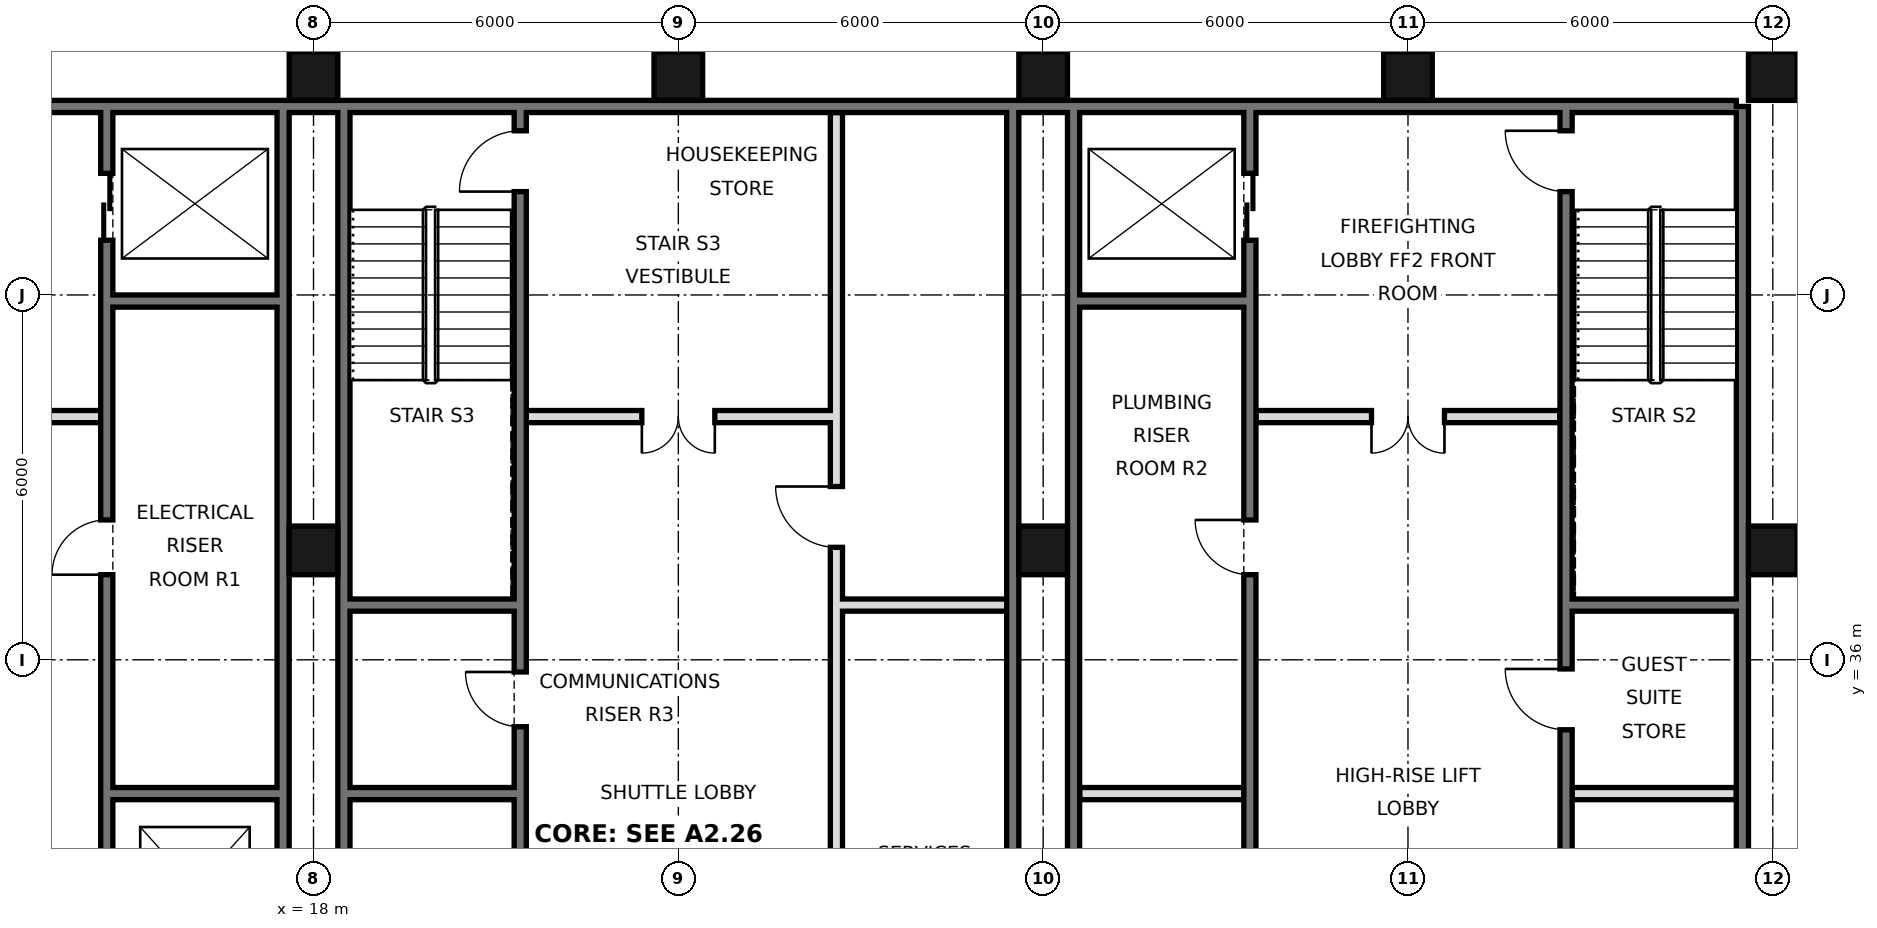
"""IFC4 building model, lengths in metres.
Left out: names, types, materials, properties, quantities, classifications, styles, units other than length and angle.
Written with IfcOpenShell. Run it as: python <this file> out.ifc"""

import sys

from ifc_helpers import new_model, si_unit, direction, frame, frame_2d, origin, origin_2d, place, context, subcontext, project, spatial, rectangle, hollow_rectangle, extrude, element, fill, save


model = new_model("IFC4")
c1 = context("Model", 3, precision=1e-05, world=origin(), true_north=direction((0.0, 1.0)))
c2 = subcontext(c1, "Body", "Model", "MODEL_VIEW")
j1 = project(units=[si_unit("LENGTHUNIT", "METRE"), si_unit("PLANEANGLEUNIT", "RADIAN")], contexts=[c1])
p1 = place(None, origin())
s1 = spatial("IfcSite", under=j1, at=p1, CompositionType="ELEMENT")
p2 = place(p1, origin())
s2 = spatial("IfcBuilding", under=s1, at=p2, CompositionType="ELEMENT")
p3 = place(p2, frame((0.0, 0.0, 103.4)))
s3 = spatial("IfcBuildingStorey", under=s2, at=p3, CompositionType="ELEMENT", Elevation=103.4)
for number, where, z_axis, x_axis in (
    (1, (18.0, 37.8, 0.0), (0.0, 0.0, 1.0), (1.0, 0.0, 0.0)),
    (2, (18.0, 45.6, 0.0), (0.0, 0.0, 1.0), (1.0, 0.0, 0.0)),
    (3, (24.0, 45.6, 0.0), (0.0, 0.0, 1.0), (1.0, 0.0, 0.0)),
    (4, (30.0, 37.8, 0.0), (0.0, 0.0, 1.0), (1.0, 0.0, 0.0)),
    (5, (30.0, 45.6, 0.0), (0.0, 0.0, 1.0), (1.0, 0.0, 0.0)),
    (6, (36.0, 45.6, 0.0), (0.0, 0.0, 1.0), (1.0, 0.0, 0.0)),
    (7, (42.0, 37.8, 0.0), (0.0, 0.0, 1.0), (1.0, 0.0, 0.0)),
    (8, (42.0, 45.6, 0.0), (0.0, 0.0, 1.0), (1.0, 0.0, 0.0)),
):
    element("IfcColumn", number, at=place(p3, frame(where, z_axis=z_axis, x_axis=x_axis)), inside=s3, PredefinedType="COLUMN", context=c2, shape_type="SweptSolid", body=[
        extrude(hollow_rectangle(XDim=0.8, YDim=0.8, WallThickness=0.05, at=origin_2d()), origin(), (0.0, 0.0, 1.0), 3.6),
    ])
p4 = place(p3, frame((41.5, 21.6, 0.0), z_axis=(0.0, 0.0, 1.0), x_axis=(0.0, 1.0, 0.0)))
e9 = element("IfcWall", 9, at=p4, inside=s3, PredefinedType="SOLIDWALL", context=c2, shape_type="SweptSolid", body=[
    extrude(rectangle(XDim=23.5, YDim=0.2, at=frame_2d((11.75, 0.0))), origin(), (0.0, 0.0, 1.0), 3.42),
])
p5 = place(p3, frame((6.6, 45.1, 0.0), z_axis=(0.0, 0.0, 1.0), x_axis=(1.0, 0.0, 0.0)))
e10 = element("IfcWall", 10, at=p5, inside=s3, PredefinedType="SOLIDWALL", context=c2, shape_type="SweptSolid", body=[
    extrude(rectangle(XDim=34.8, YDim=0.2, at=frame_2d((17.4, 0.0))), origin(), (0.0, 0.0, 1.0), 3.42),
])
for number, where, z_axis, x_axis in (
    (11, (17.5, 27.6, 0.0), (0.0, 0.0, 1.0), (0.0, 1.0, 0.0)),
    (12, (18.5, 27.6, 0.0), (0.0, 0.0, 1.0), (0.0, 1.0, 0.0)),
    (13, (29.5, 27.6, 0.0), (0.0, 0.0, 1.0), (0.0, 1.0, 0.0)),
    (14, (30.5, 27.6, 0.0), (0.0, 0.0, 1.0), (0.0, 1.0, 0.0)),
):
    element("IfcWall", number, at=place(p3, frame(where, z_axis=z_axis, x_axis=x_axis)), inside=s3, PredefinedType="SOLIDWALL", context=c2, shape_type="SweptSolid", body=[
        extrude(rectangle(XDim=17.5, YDim=0.2, at=frame_2d((8.75, 0.0))), origin(), (0.0, 0.0, 1.0), 3.42),
    ])
p6 = place(p3, frame((14.6, 27.5, 0.0), z_axis=(0.0, 0.0, 1.0), x_axis=(0.0, 1.0, 0.0)))
e15 = element("IfcWall", 15, at=p6, inside=s3, PredefinedType="SOLIDWALL", context=c2, shape_type="SweptSolid", body=[
    extrude(rectangle(XDim=17.5, YDim=0.2, at=frame_2d((8.75, 0.0))), origin(), (0.0, 0.0, 1.0), 3.42),
])
p7 = place(p6, frame((1.1, 0.0, 0.0)))
e16 = element("IfcOpeningElement", 16, at=p7, cuts=e15, PredefinedType="OPENING", context=c2, shape_type="SweptSolid", body=[
    extrude(rectangle(XDim=1.1, YDim=2.1, at=frame_2d((0.55, 1.05))), frame((0.0, 0.11, 0.0), z_axis=(0.0, -1.0, 0.0), x_axis=(1.0, 0.0, 0.0)), (0.0, 0.0, 1.0), 0.22),
])
p8 = place(p6, frame((4.2, 0.0, 0.0)))
e17 = element("IfcOpeningElement", 17, at=p8, cuts=e15, PredefinedType="OPENING", context=c2, shape_type="SweptSolid", body=[
    extrude(rectangle(XDim=1.1, YDim=2.1, at=frame_2d((0.55, 1.05))), frame((0.0, 0.11, 0.0), z_axis=(0.0, -1.0, 0.0), x_axis=(1.0, 0.0, 0.0)), (0.0, 0.0, 1.0), 0.22),
])
p9 = place(p6, frame((15.4, 0.0, 0.0)))
e18 = element("IfcOpeningElement", 18, at=p9, cuts=e15, PredefinedType="OPENING", context=c2, shape_type="SweptSolid", body=[
    extrude(rectangle(XDim=1.1, YDim=2.1, at=frame_2d((0.55, 1.05))), frame((0.0, 0.11, 0.0), z_axis=(0.0, -1.0, 0.0), x_axis=(1.0, 0.0, 0.0)), (0.0, 0.0, 1.0), 0.22),
])
p10 = place(p6, frame((9.9, 0.0, 0.0)))
e19 = element("IfcOpeningElement", 19, at=p10, cuts=e15, PredefinedType="OPENING", context=c2, shape_type="SweptSolid", body=[
    extrude(rectangle(XDim=0.9, YDim=2.1, at=frame_2d((0.45, 1.05))), frame((0.0, 0.11, 0.0), z_axis=(0.0, -1.0, 0.0), x_axis=(1.0, 0.0, 0.0)), (0.0, 0.0, 1.0), 0.22),
])
p11 = place(p3, frame((21.4, 27.5, 0.0), z_axis=(0.0, 0.0, 1.0), x_axis=(0.0, 1.0, 0.0)))
e20 = element("IfcWall", 20, at=p11, inside=s3, PredefinedType="SOLIDWALL", context=c2, shape_type="SweptSolid", body=[
    extrude(rectangle(XDim=17.5, YDim=0.2, at=frame_2d((8.75, 0.0))), origin(), (0.0, 0.0, 1.0), 3.42),
])
p12 = place(p11, frame((16.2, 0.0, 0.0)))
e21 = element("IfcOpeningElement", 21, at=p12, cuts=e20, PredefinedType="OPENING", context=c2, shape_type="SweptSolid", body=[
    extrude(rectangle(XDim=1.0, YDim=2.1, at=frame_2d((0.5, 1.05))), frame((0.0, 0.11, 0.0), z_axis=(0.0, -1.0, 0.0), x_axis=(1.0, 0.0, 0.0)), (0.0, 0.0, 1.0), 0.22),
])
p13 = place(p11, frame((7.4, 0.0, 0.0)))
e22 = element("IfcOpeningElement", 22, at=p13, cuts=e20, PredefinedType="OPENING", context=c2, shape_type="SweptSolid", body=[
    extrude(rectangle(XDim=0.9, YDim=2.1, at=frame_2d((0.45, 1.05))), frame((0.0, 0.11, 0.0), z_axis=(0.0, -1.0, 0.0), x_axis=(1.0, 0.0, 0.0)), (0.0, 0.0, 1.0), 0.22),
])
p14 = place(p3, frame((26.6, 27.5, 0.0), z_axis=(0.0, 0.0, 1.0), x_axis=(0.0, 1.0, 0.0)))
e23 = element("IfcWall", 23, at=p14, inside=s3, PredefinedType="SOLIDWALL", context=c2, shape_type="SweptSolid", body=[
    extrude(rectangle(XDim=17.5, YDim=0.2, at=frame_2d((8.75, 0.0))), origin(), (0.0, 0.0, 1.0), 3.42),
])
p15 = place(p14, frame((4.3, 0.0, 0.0)))
e24 = element("IfcOpeningElement", 24, at=p15, cuts=e23, PredefinedType="OPENING", context=c2, shape_type="SweptSolid", body=[
    extrude(rectangle(XDim=0.9, YDim=2.1, at=frame_2d((0.45, 1.05))), frame((0.0, 0.11, 0.0), z_axis=(0.0, -1.0, 0.0), x_axis=(1.0, 0.0, 0.0)), (0.0, 0.0, 1.0), 0.22),
])
p16 = place(p14, frame((10.35, 0.0, 0.0)))
e25 = element("IfcOpeningElement", 25, at=p16, cuts=e23, PredefinedType="OPENING", context=c2, shape_type="SweptSolid", body=[
    extrude(rectangle(XDim=1.0, YDim=2.1, at=frame_2d((0.5, 1.05))), frame((0.0, 0.11, 0.0), z_axis=(0.0, -1.0, 0.0), x_axis=(1.0, 0.0, 0.0)), (0.0, 0.0, 1.0), 0.22),
])
p17 = place(p3, frame((33.4, 27.5, 0.0), z_axis=(0.0, 0.0, 1.0), x_axis=(0.0, 1.0, 0.0)))
e26 = element("IfcWall", 26, at=p17, inside=s3, PredefinedType="SOLIDWALL", context=c2, shape_type="SweptSolid", body=[
    extrude(rectangle(XDim=17.5, YDim=0.2, at=frame_2d((8.75, 0.0))), origin(), (0.0, 0.0, 1.0), 3.42),
])
p18 = place(p17, frame((15.4, 0.0, 0.0)))
e27 = element("IfcOpeningElement", 27, at=p18, cuts=e26, PredefinedType="OPENING", context=c2, shape_type="SweptSolid", body=[
    extrude(rectangle(XDim=1.1, YDim=2.1, at=frame_2d((0.55, 1.05))), frame((0.0, 0.11, 0.0), z_axis=(0.0, -1.0, 0.0), x_axis=(1.0, 0.0, 0.0)), (0.0, 0.0, 1.0), 0.22),
])
p19 = place(p17, frame((2.7, 0.0, 0.0)))
e28 = element("IfcOpeningElement", 28, at=p19, cuts=e26, PredefinedType="OPENING", context=c2, shape_type="SweptSolid", body=[
    extrude(rectangle(XDim=1.0, YDim=2.1, at=frame_2d((0.5, 1.05))), frame((0.0, 0.11, 0.0), z_axis=(0.0, -1.0, 0.0), x_axis=(1.0, 0.0, 0.0)), (0.0, 0.0, 1.0), 0.22),
])
p20 = place(p17, frame((9.9, 0.0, 0.0)))
e29 = element("IfcOpeningElement", 29, at=p20, cuts=e26, PredefinedType="OPENING", context=c2, shape_type="SweptSolid", body=[
    extrude(rectangle(XDim=0.9, YDim=2.1, at=frame_2d((0.45, 1.05))), frame((0.0, 0.11, 0.0), z_axis=(0.0, -1.0, 0.0), x_axis=(1.0, 0.0, 0.0)), (0.0, 0.0, 1.0), 0.22),
])
p21 = place(p3, frame((38.6, 21.6, 0.0), z_axis=(0.0, 0.0, 1.0), x_axis=(0.0, 1.0, 0.0)))
e30 = element("IfcWall", 30, at=p21, inside=s3, PredefinedType="SOLIDWALL", context=c2, shape_type="SweptSolid", body=[
    extrude(rectangle(XDim=23.4, YDim=0.2, at=frame_2d((11.7, 0.0))), origin(), (0.0, 0.0, 1.0), 3.42),
])
p22 = place(p21, frame((8.6, 0.0, 0.0)))
e31 = element("IfcOpeningElement", 31, at=p22, cuts=e30, PredefinedType="OPENING", context=c2, shape_type="SweptSolid", body=[
    extrude(rectangle(XDim=1.0, YDim=2.1, at=frame_2d((0.5, 1.05))), frame((0.0, 0.11, 0.0), z_axis=(0.0, -1.0, 0.0), x_axis=(1.0, 0.0, 0.0)), (0.0, 0.0, 1.0), 0.22),
])
p23 = place(p21, frame((13.25, 0.0, 0.0)))
e32 = element("IfcOpeningElement", 32, at=p23, cuts=e30, PredefinedType="OPENING", context=c2, shape_type="SweptSolid", body=[
    extrude(rectangle(XDim=1.0, YDim=2.1, at=frame_2d((0.5, 1.05))), frame((0.0, 0.11, 0.0), z_axis=(0.0, -1.0, 0.0), x_axis=(1.0, 0.0, 0.0)), (0.0, 0.0, 1.0), 0.22),
])
p24 = place(p21, frame((22.1, 0.0, 0.0)))
e33 = element("IfcOpeningElement", 33, at=p24, cuts=e30, PredefinedType="OPENING", context=c2, shape_type="SweptSolid", body=[
    extrude(rectangle(XDim=1.0, YDim=2.1, at=frame_2d((0.5, 1.05))), frame((0.0, 0.11, 0.0), z_axis=(0.0, -1.0, 0.0), x_axis=(1.0, 0.0, 0.0)), (0.0, 0.0, 1.0), 0.22),
])
p25 = place(p21, frame((0.175, 0.0, 0.0)))
e34 = element("IfcOpeningElement", 34, at=p25, cuts=e30, PredefinedType="OPENING", context=c2, shape_type="SweptSolid", body=[
    extrude(rectangle(XDim=0.9, YDim=2.1, at=frame_2d((0.45, 1.05))), frame((0.0, 0.11, 0.0), z_axis=(0.0, -1.0, 0.0), x_axis=(1.0, 0.0, 0.0)), (0.0, 0.0, 1.0), 0.22),
])
for number, where, z_axis, x_axis in (
    (35, (14.7, 33.8, 0.0), (0.0, 0.0, 1.0), (1.0, 0.0, 0.0)),
    (36, (18.6, 33.8, 0.0), (0.0, 0.0, 1.0), (1.0, 0.0, 0.0)),
    (37, (30.6, 33.8, 0.0), (0.0, 0.0, 1.0), (1.0, 0.0, 0.0)),
):
    element("IfcWall", number, at=place(p3, frame(where, z_axis=z_axis, x_axis=x_axis)), inside=s3, PredefinedType="SOLIDWALL", context=c2, shape_type="SweptSolid", body=[
        extrude(rectangle(XDim=2.7, YDim=0.2, at=frame_2d((1.35, 0.0))), origin(), (0.0, 0.0, 1.0), 3.42),
    ])
p26 = place(p3, frame((38.7, 33.8, 0.0), z_axis=(0.0, 0.0, 1.0), x_axis=(1.0, 0.0, 0.0)))
e38 = element("IfcWall", 38, at=p26, inside=s3, PredefinedType="PARTITIONING", context=c2, shape_type="SweptSolid", body=[
    extrude(rectangle(XDim=2.7, YDim=0.2, at=frame_2d((1.35, 0.0))), origin(), (0.0, 0.0, 1.0), 3.42),
])
for number, where, z_axis, x_axis in (
    (39, (18.6, 36.9, 0.0), (0.0, 0.0, 1.0), (1.0, 0.0, 0.0)),
    (40, (26.7, 36.9, 0.0), (0.0, 0.0, 1.0), (1.0, 0.0, 0.0)),
    (41, (38.7, 36.9, 0.0), (0.0, 0.0, 1.0), (1.0, 0.0, 0.0)),
):
    element("IfcWall", number, at=place(p3, frame(where, z_axis=z_axis, x_axis=x_axis)), inside=s3, PredefinedType="SOLIDWALL", context=c2, shape_type="SweptSolid", body=[
        extrude(rectangle(XDim=2.7, YDim=0.2, at=frame_2d((1.35, 0.0))), origin(), (0.0, 0.0, 1.0), 3.42),
    ])
p27 = place(p3, frame((21.5, 40.0, 0.0), z_axis=(0.0, 0.0, 1.0), x_axis=(1.0, 0.0, 0.0)))
e42 = element("IfcWall", 42, at=p27, inside=s3, PredefinedType="PARTITIONING", context=c2, shape_type="SweptSolid", body=[
    extrude(rectangle(XDim=5.0, YDim=0.2, at=frame_2d((2.5, 0.0))), origin(), (0.0, 0.0, 1.0), 3.42),
])
p28 = place(p27, frame((1.9, 0.0, 0.0)))
e43 = element("IfcOpeningElement", 43, at=p28, cuts=e42, PredefinedType="OPENING", context=c2, shape_type="SweptSolid", body=[
    extrude(rectangle(XDim=1.2, YDim=2.1, at=frame_2d((0.6, 1.05))), frame((0.0, 0.11, 0.0), z_axis=(0.0, -1.0, 0.0), x_axis=(1.0, 0.0, 0.0)), (0.0, 0.0, 1.0), 0.22),
])
p29 = place(p3, frame((33.5, 40.0, 0.0), z_axis=(0.0, 0.0, 1.0), x_axis=(1.0, 0.0, 0.0)))
e44 = element("IfcWall", 44, at=p29, inside=s3, PredefinedType="PARTITIONING", context=c2, shape_type="SweptSolid", body=[
    extrude(rectangle(XDim=5.0, YDim=0.2, at=frame_2d((2.5, 0.0))), origin(), (0.0, 0.0, 1.0), 3.42),
])
p30 = place(p29, frame((1.9, 0.0, 0.0)))
e45 = element("IfcOpeningElement", 45, at=p30, cuts=e44, PredefinedType="OPENING", context=c2, shape_type="SweptSolid", body=[
    extrude(rectangle(XDim=1.2, YDim=2.1, at=frame_2d((0.6, 1.05))), frame((0.0, 0.11, 0.0), z_axis=(0.0, -1.0, 0.0), x_axis=(1.0, 0.0, 0.0)), (0.0, 0.0, 1.0), 0.22),
])
p31 = place(p3, frame((9.5, 40.0, 0.0), z_axis=(0.0, 0.0, 1.0), x_axis=(1.0, 0.0, 0.0)))
e46 = element("IfcWall", 46, at=p31, inside=s3, PredefinedType="PARTITIONING", context=c2, shape_type="SweptSolid", body=[
    extrude(rectangle(XDim=5.0, YDim=0.2, at=frame_2d((2.5, 0.0))), origin(), (0.0, 0.0, 1.0), 3.42),
])
p32 = place(p31, frame((1.9, 0.0, 0.0)))
e47 = element("IfcOpeningElement", 47, at=p32, cuts=e46, PredefinedType="OPENING", context=c2, shape_type="SweptSolid", body=[
    extrude(rectangle(XDim=1.2, YDim=2.1, at=frame_2d((0.6, 1.05))), frame((0.0, 0.11, 0.0), z_axis=(0.0, -1.0, 0.0), x_axis=(1.0, 0.0, 0.0)), (0.0, 0.0, 1.0), 0.22),
])
for number, where, z_axis, x_axis in (
    (48, (14.7, 41.9, 0.0), (0.0, 0.0, 1.0), (1.0, 0.0, 0.0)),
    (49, (30.6, 41.9, 0.0), (0.0, 0.0, 1.0), (1.0, 0.0, 0.0)),
):
    element("IfcWall", number, at=place(p3, frame(where, z_axis=z_axis, x_axis=x_axis)), inside=s3, PredefinedType="SOLIDWALL", context=c2, shape_type="SweptSolid", body=[
        extrude(rectangle(XDim=2.7, YDim=0.2, at=frame_2d((1.35, 0.0))), origin(), (0.0, 0.0, 1.0), 3.42),
    ])
p33 = place(p28, frame((1.2, 0.0, 0.0), z_axis=(0.0, 0.0, 1.0), x_axis=(-1.0, 0.0, 0.0)))
e50 = element("IfcDoor", 50, at=p33, inside=s3, OperationType="DOUBLE_DOOR_SINGLE_SWING", PredefinedType="DOOR", context=c2, shape_type="SweptSolid", body=[
    extrude(rectangle(XDim=1.2, YDim=2.1, at=frame_2d((0.6, 1.05))), frame((0.0, 0.025, 0.0), z_axis=(0.0, -1.0, 0.0), x_axis=(1.0, 0.0, 0.0)), (0.0, 0.0, 1.0), 0.05),
])
fill(e43, e50)
p34 = place(p30, frame((1.2, 0.0, 0.0), z_axis=(0.0, 0.0, 1.0), x_axis=(-1.0, 0.0, 0.0)))
e51 = element("IfcDoor", 51, at=p34, inside=s3, OperationType="DOUBLE_DOOR_SINGLE_SWING", PredefinedType="DOOR", context=c2, shape_type="SweptSolid", body=[
    extrude(rectangle(XDim=1.2, YDim=2.1, at=frame_2d((0.6, 1.05))), frame((0.0, 0.025, 0.0), z_axis=(0.0, -1.0, 0.0), x_axis=(1.0, 0.0, 0.0)), (0.0, 0.0, 1.0), 0.05),
])
fill(e45, e51)
p35 = place(p18, origin())
e52 = element("IfcDoor", 52, at=p35, inside=s3, OperationType="DOUBLE_DOOR_SLIDING", PredefinedType="DOOR", context=c2, shape_type="SweptSolid", body=[
    extrude(rectangle(XDim=1.1, YDim=2.1, at=frame_2d((0.55, 1.05))), frame((0.0, 0.025, 0.0), z_axis=(0.0, -1.0, 0.0), x_axis=(1.0, 0.0, 0.0)), (0.0, 0.0, 1.0), 0.05),
])
fill(e27, e52)
p36 = place(p9, origin())
e53 = element("IfcDoor", 53, at=p36, inside=s3, OperationType="DOUBLE_DOOR_SLIDING", PredefinedType="DOOR", context=c2, shape_type="SweptSolid", body=[
    extrude(rectangle(XDim=1.1, YDim=2.1, at=frame_2d((0.55, 1.05))), frame((0.0, 0.025, 0.0), z_axis=(0.0, -1.0, 0.0), x_axis=(1.0, 0.0, 0.0)), (0.0, 0.0, 1.0), 0.05),
])
fill(e18, e53)
p37 = place(p23, frame((1.0, 0.0, 0.0), z_axis=(0.0, 0.0, 1.0), x_axis=(-1.0, 0.0, 0.0)))
e54 = element("IfcDoor", 54, at=p37, inside=s3, OperationType="SINGLE_SWING_LEFT", PredefinedType="DOOR", context=c2, shape_type="SweptSolid", body=[
    extrude(rectangle(XDim=1.0, YDim=2.1, at=frame_2d((0.5, 1.05))), frame((0.0, 0.025, 0.0), z_axis=(0.0, -1.0, 0.0), x_axis=(1.0, 0.0, 0.0)), (0.0, 0.0, 1.0), 0.05),
])
fill(e32, e54)
p38 = place(p24, frame((1.0, 0.0, 0.0), z_axis=(0.0, 0.0, 1.0), x_axis=(-1.0, 0.0, 0.0)))
e55 = element("IfcDoor", 55, at=p38, inside=s3, OperationType="SINGLE_SWING_LEFT", PredefinedType="DOOR", context=c2, shape_type="SweptSolid", body=[
    extrude(rectangle(XDim=1.0, YDim=2.1, at=frame_2d((0.5, 1.05))), frame((0.0, 0.025, 0.0), z_axis=(0.0, -1.0, 0.0), x_axis=(1.0, 0.0, 0.0)), (0.0, 0.0, 1.0), 0.05),
])
fill(e33, e55)
p39 = place(p12, origin())
e56 = element("IfcDoor", 56, at=p39, inside=s3, OperationType="SINGLE_SWING_LEFT", PredefinedType="DOOR", context=c2, shape_type="SweptSolid", body=[
    extrude(rectangle(XDim=1.0, YDim=2.1, at=frame_2d((0.5, 1.05))), frame((0.0, 0.025, 0.0), z_axis=(0.0, -1.0, 0.0), x_axis=(1.0, 0.0, 0.0)), (0.0, 0.0, 1.0), 0.05),
])
fill(e21, e56)
p40 = place(p10, origin())
e57 = element("IfcDoor", 57, at=p40, inside=s3, OperationType="SINGLE_SWING_LEFT", PredefinedType="DOOR", context=c2, shape_type="SweptSolid", body=[
    extrude(rectangle(XDim=0.9, YDim=2.1, at=frame_2d((0.45, 1.05))), frame((0.0, 0.025, 0.0), z_axis=(0.0, -1.0, 0.0), x_axis=(1.0, 0.0, 0.0)), (0.0, 0.0, 1.0), 0.05),
])
fill(e19, e57)
p41 = place(p20, frame((0.9, 0.0, 0.0), z_axis=(0.0, 0.0, 1.0), x_axis=(-1.0, 0.0, 0.0)))
e58 = element("IfcDoor", 58, at=p41, inside=s3, OperationType="SINGLE_SWING_LEFT", PredefinedType="DOOR", context=c2, shape_type="SweptSolid", body=[
    extrude(rectangle(XDim=0.9, YDim=2.1, at=frame_2d((0.45, 1.05))), frame((0.0, 0.025, 0.0), z_axis=(0.0, -1.0, 0.0), x_axis=(1.0, 0.0, 0.0)), (0.0, 0.0, 1.0), 0.05),
])
fill(e29, e58)
p42 = place(p13, frame((0.9, 0.0, 0.0), z_axis=(0.0, 0.0, 1.0), x_axis=(-1.0, 0.0, 0.0)))
e59 = element("IfcDoor", 59, at=p42, inside=s3, OperationType="SINGLE_SWING_LEFT", PredefinedType="DOOR", context=c2, shape_type="SweptSolid", body=[
    extrude(rectangle(XDim=0.9, YDim=2.1, at=frame_2d((0.45, 1.05))), frame((0.0, 0.025, 0.0), z_axis=(0.0, -1.0, 0.0), x_axis=(1.0, 0.0, 0.0)), (0.0, 0.0, 1.0), 0.05),
])
fill(e22, e59)
p43 = place(p16, frame((1.0, 0.0, 0.0), z_axis=(0.0, 0.0, 1.0), x_axis=(-1.0, 0.0, 0.0)))
e60 = element("IfcDoor", 60, at=p43, inside=s3, OperationType="SINGLE_SWING_LEFT", PredefinedType="DOOR", context=c2, shape_type="SweptSolid", body=[
    extrude(rectangle(XDim=1.0, YDim=2.1, at=frame_2d((0.5, 1.05))), frame((0.0, 0.025, 0.0), z_axis=(0.0, -1.0, 0.0), x_axis=(1.0, 0.0, 0.0)), (0.0, 0.0, 1.0), 0.05),
])
fill(e25, e60)
save(model, sys.argv[1])
